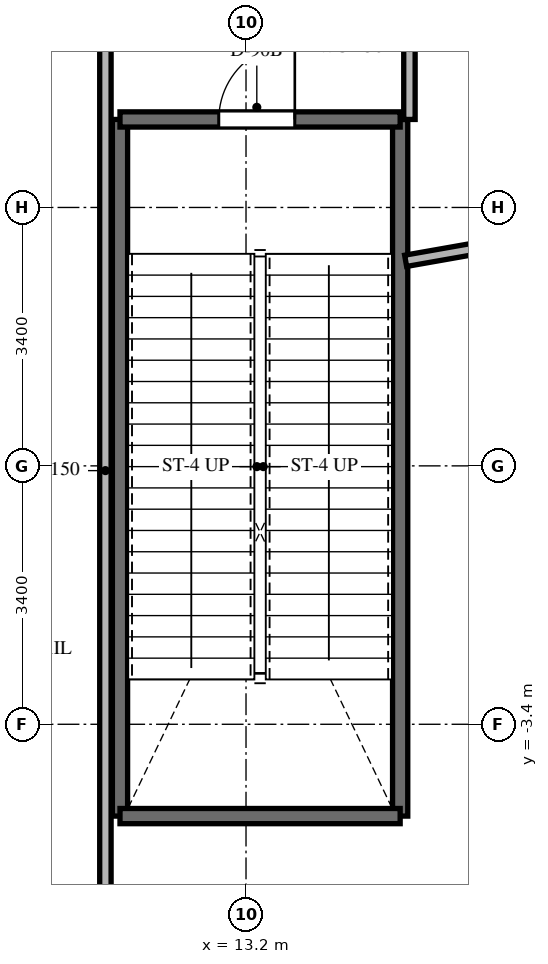
"""IFC4 building model, lengths in metres.
Left out: names, types, materials, properties, quantities, classifications, styles, units other than length and angle.
Written with IfcOpenShell. Run it as: python <this file> out.ifc"""

import sys

from ifc_helpers import new_model, si_unit, direction, frame, frame_2d, origin, place, context, subcontext, project, spatial, rectangle, extrude, element, fill, save


model = new_model("IFC4")
c1 = context("Model", 3, precision=1e-05, world=origin(), true_north=direction((0.0, 1.0)))
c2 = subcontext(c1, "Body", "Model", "MODEL_VIEW")
j1 = project(units=[si_unit("LENGTHUNIT", "METRE"), si_unit("PLANEANGLEUNIT", "RADIAN")], contexts=[c1])
p1 = place(None, origin())
s1 = spatial("IfcSite", under=j1, at=p1, CompositionType="ELEMENT")
p2 = place(p1, origin())
s2 = spatial("IfcBuilding", under=s1, at=p2, CompositionType="ELEMENT")
p3 = place(p2, frame((0.0, 0.0, 11.4)))
s3 = spatial("IfcBuildingStorey", under=s2, at=p3, CompositionType="ELEMENT", Elevation=11.4)
for number, where, z_axis, x_axis in (
    (1, (11.542, -4.608, 0.0), (0.0, 0.0, 1.0), (0.0, 1.0, 0.0)),
    (2, (15.228, -4.608, 0.0), (0.0, 0.0, 1.0), (0.0, 1.0, 0.0)),
):
    element("IfcWall", number, at=place(p3, frame(where, z_axis=z_axis, x_axis=x_axis)), inside=s3, PredefinedType="SHEAR", context=c2, shape_type="SweptSolid", body=[
        extrude(rectangle(XDim=9.166, YDim=0.2, at=frame_2d((4.583, 0.0))), origin(), (0.0, 0.0, 1.0), 7.2),
    ])
p4 = place(p3, frame((11.542, -4.608, 0.0), z_axis=(0.0, 0.0, 1.0), x_axis=(1.0, 0.0, 0.0)))
e3 = element("IfcWall", 3, at=p4, inside=s3, PredefinedType="SHEAR", context=c2, shape_type="SweptSolid", body=[
    extrude(rectangle(XDim=3.686, YDim=0.2, at=frame_2d((1.843, 0.0))), origin(), (0.0, 0.0, 1.0), 7.2),
])
p5 = place(p3, frame((11.542, 4.558, 0.0), z_axis=(0.0, 0.0, 1.0), x_axis=(1.0, 0.0, 0.0)))
e4 = element("IfcWall", 4, at=p5, inside=s3, PredefinedType="SHEAR", context=c2, shape_type="SweptSolid", body=[
    extrude(rectangle(XDim=3.686, YDim=0.2, at=frame_2d((1.843, 0.0))), origin(), (0.0, 0.0, 1.0), 7.2),
])
p6 = place(p5, frame((1.3, 0.0, 0.0)))
e5 = element("IfcOpeningElement", 5, at=p6, cuts=e4, PredefinedType="OPENING", context=c2, shape_type="SweptSolid", body=[
    extrude(rectangle(XDim=1.0, YDim=2.15, at=frame_2d((0.5, 1.075))), frame((0.0, 0.11, 0.0), z_axis=(0.0, -1.0, 0.0), x_axis=(1.0, 0.0, 0.0)), (0.0, 0.0, 1.0), 0.22),
])
p7 = place(p3, frame((11.35, 9.85, 0.0), z_axis=(0.0, 0.0, 1.0), x_axis=(0.0, -1.0, 0.0)))
e6 = element("IfcWall", 6, at=p7, inside=s3, PredefinedType="PARTITIONING", context=c2, shape_type="SweptSolid", body=[
    extrude(rectangle(XDim=19.7, YDim=0.15, at=frame_2d((9.85, 0.0))), origin(), (0.0, 0.0, 1.0), 5.922),
])
p8 = place(p7, frame((2.1, 0.0, 0.0)))
e7 = element("IfcOpeningElement", 7, at=p8, cuts=e6, PredefinedType="OPENING", context=c2, shape_type="SweptSolid", body=[
    extrude(rectangle(XDim=0.9, YDim=2.03, at=frame_2d((0.45, 1.015))), frame((0.0, 0.085, 0.0), z_axis=(0.0, -1.0, 0.0), x_axis=(1.0, 0.0, 0.0)), (0.0, 0.0, 1.0), 0.17),
])
p9 = place(p7, frame((16.875, 0.0, 0.0)))
e8 = element("IfcOpeningElement", 8, at=p9, cuts=e6, PredefinedType="OPENING", context=c2, shape_type="SweptSolid", body=[
    extrude(rectangle(XDim=1.0, YDim=2.03, at=frame_2d((0.5, 1.015))), frame((0.0, 0.085, 0.0), z_axis=(0.0, -1.0, 0.0), x_axis=(1.0, 0.0, 0.0)), (0.0, 0.0, 1.0), 0.17),
])
p10 = place(p3, frame((15.35, 4.558, 0.0), z_axis=(0.0, 0.0, 1.0), x_axis=(0.0, 1.0, 0.0)))
e9 = element("IfcWall", 9, at=p10, inside=s3, PredefinedType="PARTITIONING", context=c2, shape_type="SweptSolid", body=[
    extrude(rectangle(XDim=1.892, YDim=0.15, at=frame_2d((0.946, 0.0))), origin(), (0.0, 0.0, 1.0), 6.88),
])
p11 = place(p3, frame((15.3, 2.698, 0.0), z_axis=(0.0, 0.0, 1.0), x_axis=(0.984806610591, 0.173654656533, 0.0)))
e10 = element("IfcWall", 10, at=p11, inside=s3, PredefinedType="PARTITIONING", context=c2, shape_type="SweptSolid", body=[
    extrude(rectangle(XDim=13.429, YDim=0.15, at=frame_2d((6.715, 0.0))), origin(), (0.0, 0.0, 1.0), 6.014),
])
p12 = place(p6, origin())
e11 = element("IfcDoor", 11, at=p12, inside=s3, OperationType="SINGLE_SWING_RIGHT", PredefinedType="DOOR", context=c2, shape_type="SweptSolid", body=[
    extrude(rectangle(XDim=1.0, YDim=2.15, at=frame_2d((0.5, 1.075))), frame((0.0, 0.025, 0.0), z_axis=(0.0, -1.0, 0.0), x_axis=(1.0, 0.0, 0.0)), (0.0, 0.0, 1.0), 0.05),
])
fill(e5, e11)
save(model, sys.argv[1])
